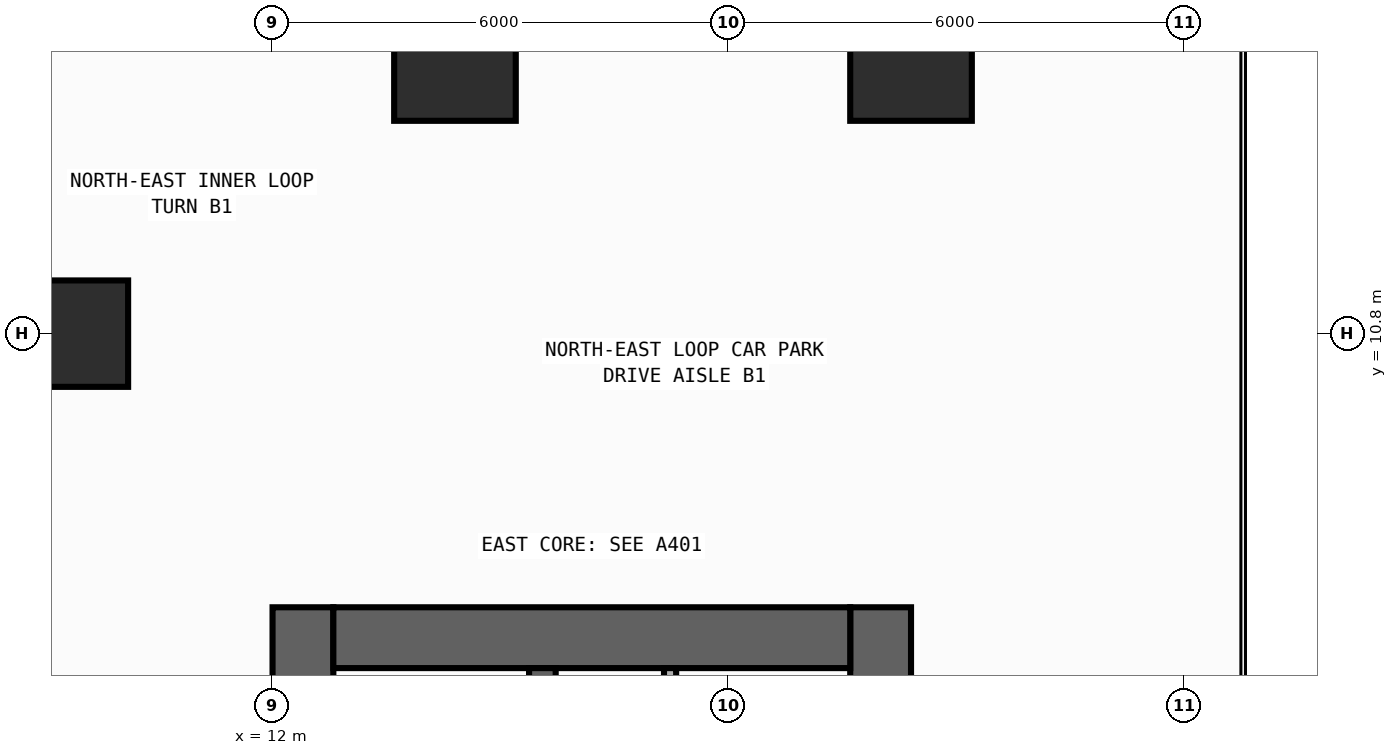
"""IFC4 building model, lengths in metres.
Left out: names, types, materials, properties, quantities, classifications, styles, units other than length and angle.
Written with IfcOpenShell. Run it as: python <this file> out.ifc"""

import sys

from ifc_helpers import new_model, si_unit, direction, frame, frame_2d, origin, origin_2d, place, context, subcontext, project, spatial, rectangle, extrude, element, save


model = new_model("IFC4")
c1 = context("Model", 3, precision=1e-05, world=origin(), true_north=direction((0.0, 1.0)))
c2 = subcontext(c1, "Body", "Model", "MODEL_VIEW")
j1 = project(units=[si_unit("LENGTHUNIT", "METRE"), si_unit("PLANEANGLEUNIT", "RADIAN")], contexts=[c1])
p1 = place(None, origin())
s1 = spatial("IfcSite", under=j1, at=p1, CompositionType="ELEMENT")
p2 = place(p1, origin())
s2 = spatial("IfcBuilding", under=s1, at=p2, CompositionType="ELEMENT")
p3 = place(p2, frame((0.0, 0.0, -4.5)))
s3 = spatial("IfcBuildingStorey", under=s2, at=p3, CompositionType="ELEMENT", Elevation=-4.5)
p4 = place(p3, frame((12.4, -19.8, 0.0), z_axis=(0.0, 0.0, 1.0), x_axis=(0.0, 1.0, 0.0)))
e1 = element("IfcWall", 1, at=p4, inside=s3, PredefinedType="SHEAR", context=c2, shape_type="SweptSolid", body=[
    extrude(rectangle(XDim=27.0, YDim=0.8, at=frame_2d((13.5, 0.0))), origin(), (0.0, 0.0, 1.0), 4.2),
])
p5 = place(p4, frame((19.875, 0.0, 0.0)))
e2 = element("IfcOpeningElement", 2, at=p5, cuts=e1, PredefinedType="OPENING", context=c2, shape_type="SweptSolid", body=[
    extrude(rectangle(XDim=0.85, YDim=2.1, at=frame_2d((0.425, 1.05))), frame((0.0, 0.41, 0.0), z_axis=(0.0, -1.0, 0.0), x_axis=(1.0, 0.0, 0.0)), (0.0, 0.0, 1.0), 0.82),
])
p6 = place(p4, frame((10.175, 0.0, 0.0)))
e3 = element("IfcOpeningElement", 3, at=p6, cuts=e1, PredefinedType="OPENING", context=c2, shape_type="SweptSolid", body=[
    extrude(rectangle(XDim=0.85, YDim=2.1, at=frame_2d((0.425, 1.05))), frame((0.0, 0.41, 0.0), z_axis=(0.0, -1.0, 0.0), x_axis=(1.0, 0.0, 0.0)), (0.0, 0.0, 1.0), 0.82),
])
p7 = place(p4, frame((12.725, 0.0, 0.0)))
e4 = element("IfcOpeningElement", 4, at=p7, cuts=e1, PredefinedType="OPENING", context=c2, shape_type="SweptSolid", body=[
    extrude(rectangle(XDim=1.15, YDim=2.2, at=frame_2d((0.575, 1.1))), frame((0.0, 0.41, 0.0), z_axis=(0.0, -1.0, 0.0), x_axis=(1.0, 0.0, 0.0)), (0.0, 0.0, 1.0), 0.82),
])
p8 = place(p4, frame((25.125, 0.0, 0.0)))
e5 = element("IfcOpeningElement", 5, at=p8, cuts=e1, PredefinedType="OPENING", context=c2, shape_type="SweptSolid", body=[
    extrude(rectangle(XDim=0.85, YDim=2.1, at=frame_2d((0.425, 1.05))), frame((0.0, 0.41, 0.0), z_axis=(0.0, -1.0, 0.0), x_axis=(1.0, 0.0, 0.0)), (0.0, 0.0, 1.0), 0.82),
])
p9 = place(p3, frame((20.0, -19.8, 0.0), z_axis=(0.0, 0.0, 1.0), x_axis=(0.0, 1.0, 0.0)))
e6 = element("IfcWall", 6, at=p9, inside=s3, PredefinedType="SHEAR", context=c2, shape_type="SweptSolid", body=[
    extrude(rectangle(XDim=27.0, YDim=0.8, at=frame_2d((13.5, 0.0))), origin(), (0.0, 0.0, 1.0), 4.2),
])
p10 = place(p3, frame((12.8, 6.8, 0.0), z_axis=(0.0, 0.0, 1.0), x_axis=(1.0, 0.0, 0.0)))
e7 = element("IfcWall", 7, at=p10, inside=s3, PredefinedType="SHEAR", context=c2, shape_type="SweptSolid", body=[
    extrude(rectangle(XDim=6.8, YDim=0.8, at=frame_2d((3.4, 0.0))), origin(), (0.0, 0.0, 1.0), 4.2),
])
p11 = place(p3, frame((15.55, -19.0, 0.0), z_axis=(0.0, 0.0, 1.0), x_axis=(0.0, 1.0, 0.0)))
e8 = element("IfcWall", 8, at=p11, inside=s3, PredefinedType="SHEAR", context=c2, shape_type="SweptSolid", body=[
    extrude(rectangle(XDim=25.4, YDim=0.35, at=frame_2d((12.7, 0.0))), origin(), (0.0, 0.0, 1.0), 4.2),
])
p12 = place(p11, frame((11.925, 0.0, 0.0)))
e9 = element("IfcOpeningElement", 9, at=p12, cuts=e8, PredefinedType="OPENING", context=c2, shape_type="SweptSolid", body=[
    extrude(rectangle(XDim=1.15, YDim=2.2, at=frame_2d((0.575, 1.1))), frame((0.0, 0.185, 0.0), z_axis=(0.0, -1.0, 0.0), x_axis=(1.0, 0.0, 0.0)), (0.0, 0.0, 1.0), 0.37),
])
p13 = place(p11, frame((24.325, 0.0, 0.0)))
e10 = element("IfcOpeningElement", 10, at=p13, cuts=e8, PredefinedType="OPENING", context=c2, shape_type="SweptSolid", body=[
    extrude(rectangle(XDim=0.85, YDim=2.1, at=frame_2d((0.425, 1.05))), frame((0.0, 0.185, 0.0), z_axis=(0.0, -1.0, 0.0), x_axis=(1.0, 0.0, 0.0)), (0.0, 0.0, 1.0), 0.37),
])
p14 = place(p3, frame((9.2, 10.8, 0.0), z_axis=(0.0, 0.0, 1.0), x_axis=(1.0, 0.0, 0.0)))
e11 = element("IfcColumn", 11, at=p14, inside=s3, PredefinedType="COLUMN", context=c2, shape_type="SweptSolid", body=[
    extrude(rectangle(XDim=1.8, YDim=1.4, at=origin_2d()), origin(), (0.0, 0.0, 1.0), 4.5),
])
for number, where, z_axis, x_axis in (
    (12, (20.4, 14.4, 0.0), (0.0, 0.0, 1.0), (1.0, 0.0, 0.0)),
    (13, (14.4, 14.4, 0.0), (0.0, 0.0, 1.0), (1.0, 0.0, 0.0)),
):
    element("IfcColumn", number, at=place(p3, frame(where, z_axis=z_axis, x_axis=x_axis)), inside=s3, PredefinedType="COLUMN", context=c2, shape_type="SweptSolid", body=[
        extrude(rectangle(XDim=1.6, YDim=1.6, at=origin_2d()), origin(), (0.0, 0.0, 1.0), 4.5),
    ])
p15 = place(p3, frame((17.23, 4.17, 0.0), z_axis=(0.0, 0.0, 1.0), x_axis=(0.0, 1.0, 0.0)))
e14 = element("IfcWall", 14, at=p15, inside=s3, PredefinedType="PARTITIONING", context=c2, shape_type="SweptSolid", body=[
    extrude(rectangle(XDim=2.23, YDim=0.16, at=frame_2d((1.115, 0.0))), origin(), (0.0, 0.0, 1.0), 4.2),
])
p16 = place(p15, frame((0.46, 0.0, 0.0)))
e15 = element("IfcOpeningElement", 15, at=p16, cuts=e14, PredefinedType="OPENING", context=c2, shape_type="SweptSolid", body=[
    extrude(rectangle(XDim=0.85, YDim=2.1, at=frame_2d((0.425, 1.05))), frame((0.0, 0.09, 0.0), z_axis=(0.0, -1.0, 0.0), x_axis=(1.0, 0.0, 0.0)), (0.0, 0.0, 1.0), 0.18),
])
save(model, sys.argv[1])
